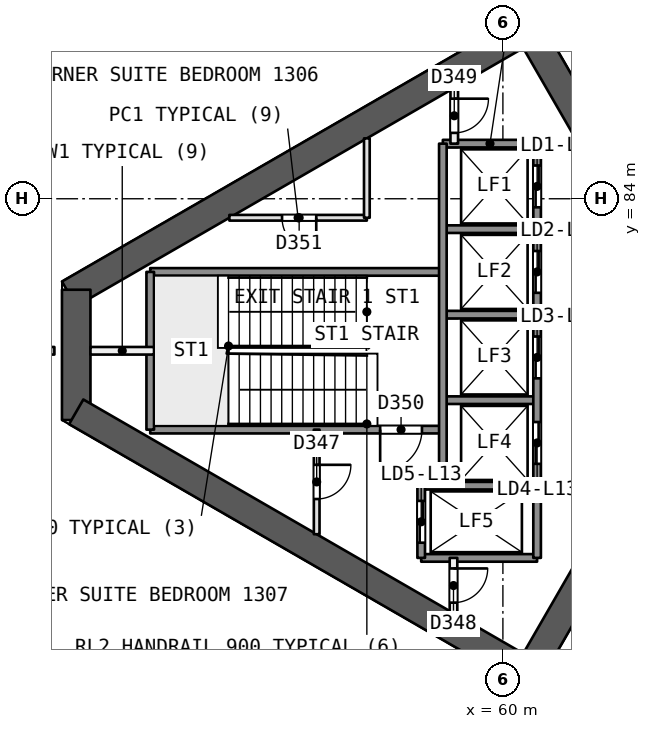
"""IFC4 building model, lengths in metres.
Left out: names, types, materials, properties, quantities, classifications, styles, units other than length and angle.
Written with IfcOpenShell. Run it as: python <this file> out.ifc"""

import sys

from ifc_helpers import new_model, si_unit, direction, frame, frame_2d, origin, place, context, subcontext, project, spatial, rectangle, extrude, element, fill, save


model = new_model("IFC4")
c1 = context("Model", 3, precision=1e-05, world=origin(), true_north=direction((0.0, 1.0)))
c2 = subcontext(c1, "Body", "Model", "MODEL_VIEW")
j1 = project(units=[si_unit("LENGTHUNIT", "METRE"), si_unit("PLANEANGLEUNIT", "RADIAN")], contexts=[c1])
p1 = place(None, origin())
s1 = spatial("IfcSite", under=j1, at=p1, CompositionType="ELEMENT")
p2 = place(p1, origin())
s2 = spatial("IfcBuilding", under=s1, at=p2, CompositionType="ELEMENT")
p3 = place(p2, frame((0.0, 0.0, 61.0)))
s3 = spatial("IfcBuildingStorey", under=s2, at=p3, CompositionType="ELEMENT", Elevation=61.0)
p4 = place(p3, frame((65.567, 80.0, 0.0), z_axis=(0.0, 0.0, 1.0), x_axis=(-0.499988615364, 0.866031976607, 0.0)))
e1 = element("IfcWall", 1, at=p4, inside=s3, PredefinedType="SHEAR", context=c2, shape_type="SweptSolid", body=[
    extrude(rectangle(XDim=10.163, YDim=0.75, at=frame_2d((5.082, 0.0))), origin(), (0.0, 0.0, 1.0), 3.7),
])
p5 = place(p4, frame((0.733, 0.0, 0.0)))
e2 = element("IfcOpeningElement", 2, at=p5, cuts=e1, PredefinedType="OPENING", context=c2, shape_type="SweptSolid", body=[
    extrude(rectangle(XDim=1.2, YDim=2.1, at=frame_2d((0.6, 1.05))), frame((0.0, 0.385, 0.0), z_axis=(0.0, -1.0, 0.0), x_axis=(1.0, 0.0, 0.0)), (0.0, 0.0, 1.0), 0.771),
])
p6 = place(p3, frame((60.673, 88.477, 0.0), z_axis=(0.0, 0.0, 1.0), x_axis=(-0.8660248072, -0.500001033313, 0.0)))
e3 = element("IfcWall", 3, at=p6, inside=s3, PredefinedType="SHEAR", context=c2, shape_type="SweptSolid", body=[
    extrude(rectangle(XDim=13.958, YDim=0.75, at=frame_2d((6.979, 0.0))), origin(), (0.0, 0.0, 1.0), 3.7),
])
p7 = place(p3, frame((48.772, 81.606, 0.0), z_axis=(0.0, 0.0, 1.0), x_axis=(0.0, -1.0, 0.0)))
e4 = element("IfcWall", 4, at=p7, inside=s3, PredefinedType="SHEAR", context=c2, shape_type="SweptSolid", body=[
    extrude(rectangle(XDim=3.429, YDim=0.75, at=frame_2d((1.714, 0.0))), origin(), (0.0, 0.0, 1.0), 3.7),
])
p8 = place(p3, frame((48.772, 78.394, 0.0), z_axis=(0.0, 0.0, 1.0), x_axis=(0.866028339916, -0.499994914436, 0.0)))
e5 = element("IfcWall", 5, at=p8, inside=s3, PredefinedType="SHEAR", context=c2, shape_type="SweptSolid", body=[
    extrude(rectangle(XDim=14.117, YDim=0.75, at=frame_2d((7.059, 0.0))), origin(), (0.0, 0.0, 1.0), 3.7),
])
p9 = place(p3, frame((60.673, 71.523, 0.0), z_axis=(0.0, 0.0, 1.0), x_axis=(0.499997052475, 0.866027105532, 0.0)))
e6 = element("IfcWall", 6, at=p9, inside=s3, PredefinedType="SHEAR", context=c2, shape_type="SweptSolid", body=[
    extrude(rectangle(XDim=10.005, YDim=0.75, at=frame_2d((5.002, 0.0))), origin(), (0.0, 0.0, 1.0), 3.7),
])
p10 = place(p9, frame((7.855, 0.0, 0.0)))
e7 = element("IfcOpeningElement", 7, at=p10, cuts=e6, PredefinedType="OPENING", context=c2, shape_type="SweptSolid", body=[
    extrude(rectangle(XDim=1.2, YDim=2.1, at=frame_2d((0.6, 1.05))), frame((0.0, 0.385, 0.0), z_axis=(0.0, -1.0, 0.0), x_axis=(1.0, 0.0, 0.0)), (0.0, 0.0, 1.0), 0.771),
])
p11 = place(p3, frame((38.72, 80.0, 0.0), z_axis=(0.0, 0.0, 1.0), x_axis=(1.0, 0.0, 0.0)))
e8 = element("IfcWall", 8, at=p11, inside=s3, PredefinedType="PARTITIONING", context=c2, shape_type="SweptSolid", body=[
    extrude(rectangle(XDim=9.478, YDim=0.2, at=frame_2d((4.739, 0.0))), origin(), (0.0, 0.0, 1.0), 3.2),
])
p12 = place(p3, frame((38.571, 83.071, 0.0), z_axis=(0.0, 0.0, 1.0), x_axis=(0.866024926003, 0.500000827541, 0.0)))
e9 = element("IfcWall", 9, at=p12, inside=s3, PredefinedType="SOLIDWALL", context=c2, shape_type="SweptSolid", body=[
    extrude(rectangle(XDim=60.025, YDim=0.3, at=frame_2d((30.013, 0.0))), origin(), (0.0, 0.0, 1.0), 3.2),
])
p13 = place(p12, frame((33.489, 0.0, 0.0)))
e10 = element("IfcOpeningElement", 10, at=p13, cuts=e9, PredefinedType="OPENING", context=c2, shape_type="SweptSolid", body=[
    extrude(rectangle(XDim=2.4, YDim=2.4, at=frame_2d((1.2, 1.2))), frame((0.0, 0.161, 0.0), z_axis=(0.0, -1.0, 0.0), x_axis=(1.0, 0.0, 0.0)), (0.0, 0.0, 1.0), 0.321),
])
p14 = place(p12, frame((46.558, 0.0, 0.0)))
e11 = element("IfcOpeningElement", 11, at=p14, cuts=e9, PredefinedType="OPENING", context=c2, shape_type="SweptSolid", body=[
    extrude(rectangle(XDim=2.4, YDim=2.4, at=frame_2d((1.2, 1.2))), frame((0.0, 0.161, 0.0), z_axis=(0.0, -1.0, 0.0), x_axis=(1.0, 0.0, 0.0)), (0.0, 0.0, 1.0), 0.321),
])
p15 = place(p12, frame((24.136, 0.0, 0.0)))
e12 = element("IfcOpeningElement", 12, at=p15, cuts=e9, PredefinedType="OPENING", context=c2, shape_type="SweptSolid", body=[
    extrude(rectangle(XDim=2.4, YDim=2.4, at=frame_2d((1.2, 1.2))), frame((0.0, 0.161, 0.0), z_axis=(0.0, -1.0, 0.0), x_axis=(1.0, 0.0, 0.0)), (0.0, 0.0, 1.0), 0.321),
])
p16 = place(p12, frame((11.109, 0.0, 0.0)))
e13 = element("IfcOpeningElement", 13, at=p16, cuts=e9, PredefinedType="OPENING", context=c2, shape_type="SweptSolid", body=[
    extrude(rectangle(XDim=2.4, YDim=2.4, at=frame_2d((1.2, 1.2))), frame((0.0, 0.161, 0.0), z_axis=(0.0, -1.0, 0.0), x_axis=(1.0, 0.0, 0.0)), (0.0, 0.0, 1.0), 0.321),
])
p17 = place(p12, frame((28.813, 0.0, 0.0)))
e14 = element("IfcOpeningElement", 14, at=p17, cuts=e9, PredefinedType="OPENING", context=c2, shape_type="SweptSolid", body=[
    extrude(rectangle(XDim=2.4, YDim=2.4, at=frame_2d((1.2, 1.2))), frame((0.0, 0.161, 0.0), z_axis=(0.0, -1.0, 0.0), x_axis=(1.0, 0.0, 0.0)), (0.0, 0.0, 1.0), 0.321),
])
p18 = place(p3, frame((90.555, 46.916, 0.0), z_axis=(0.0, 0.0, 1.0), x_axis=(-0.866024926003, 0.500000827541, 0.0)))
e15 = element("IfcWall", 15, at=p18, inside=s3, PredefinedType="SOLIDWALL", context=c2, shape_type="SweptSolid", body=[
    extrude(rectangle(XDim=60.025, YDim=0.3, at=frame_2d((30.013, 0.0))), origin(), (0.0, 0.0, 1.0), 3.2),
])
p19 = place(p18, frame((28.813, 0.0, 0.0)))
e16 = element("IfcOpeningElement", 16, at=p19, cuts=e15, PredefinedType="OPENING", context=c2, shape_type="SweptSolid", body=[
    extrude(rectangle(XDim=2.4, YDim=2.4, at=frame_2d((1.2, 1.2))), frame((0.0, 0.161, 0.0), z_axis=(0.0, -1.0, 0.0), x_axis=(1.0, 0.0, 0.0)), (0.0, 0.0, 1.0), 0.321),
])
p20 = place(p18, frame((34.269, 0.0, 0.0)))
e17 = element("IfcOpeningElement", 17, at=p20, cuts=e15, PredefinedType="OPENING", context=c2, shape_type="SweptSolid", body=[
    extrude(rectangle(XDim=2.4, YDim=2.4, at=frame_2d((1.2, 1.2))), frame((0.0, 0.161, 0.0), z_axis=(0.0, -1.0, 0.0), x_axis=(1.0, 0.0, 0.0)), (0.0, 0.0, 1.0), 0.321),
])
p21 = place(p18, frame((46.558, 0.0, 0.0)))
e18 = element("IfcOpeningElement", 18, at=p21, cuts=e15, PredefinedType="OPENING", context=c2, shape_type="SweptSolid", body=[
    extrude(rectangle(XDim=2.4, YDim=2.4, at=frame_2d((1.2, 1.2))), frame((0.0, 0.161, 0.0), z_axis=(0.0, -1.0, 0.0), x_axis=(1.0, 0.0, 0.0)), (0.0, 0.0, 1.0), 0.321),
])
p22 = place(p18, frame((23.357, 0.0, 0.0)))
e19 = element("IfcOpeningElement", 19, at=p22, cuts=e15, PredefinedType="OPENING", context=c2, shape_type="SweptSolid", body=[
    extrude(rectangle(XDim=2.4, YDim=2.4, at=frame_2d((1.2, 1.2))), frame((0.0, 0.161, 0.0), z_axis=(0.0, -1.0, 0.0), x_axis=(1.0, 0.0, 0.0)), (0.0, 0.0, 1.0), 0.321),
])
p23 = place(p18, frame((11.109, 0.0, 0.0)))
e20 = element("IfcOpeningElement", 20, at=p23, cuts=e15, PredefinedType="OPENING", context=c2, shape_type="SweptSolid", body=[
    extrude(rectangle(XDim=2.4, YDim=2.4, at=frame_2d((1.2, 1.2))), frame((0.0, 0.161, 0.0), z_axis=(0.0, -1.0, 0.0), x_axis=(1.0, 0.0, 0.0)), (0.0, 0.0, 1.0), 0.321),
])
p24 = place(p3, frame((60.9, 85.45, 0.0), z_axis=(0.0, 0.0, 1.0), x_axis=(-1.0, 0.0, 0.0)))
e21 = element("IfcWall", 21, at=p24, inside=s3, PredefinedType="SOLIDWALL", context=c2, shape_type="SweptSolid", body=[
    extrude(rectangle(XDim=2.48, YDim=0.2, at=frame_2d((1.24, 0.0))), origin(), (0.0, 0.0, 1.0), 3.2),
])
p25 = place(p3, frame((56.42, 83.5, 0.0), z_axis=(0.0, 0.0, 1.0), x_axis=(-1.0, 0.0, 0.0)))
e22 = element("IfcWall", 22, at=p25, inside=s3, PredefinedType="PARTITIONING", context=c2, shape_type="SweptSolid", body=[
    extrude(rectangle(XDim=3.618, YDim=0.15, at=frame_2d((1.809, 0.0))), origin(), (0.0, 0.0, 1.0), 3.2),
])
p26 = place(p25, frame((1.332, 0.0, 0.0)))
e23 = element("IfcOpeningElement", 23, at=p26, cuts=e22, PredefinedType="OPENING", context=c2, shape_type="SweptSolid", body=[
    extrude(rectangle(XDim=0.9, YDim=2.1, at=frame_2d((0.45, 1.05))), frame((0.0, 0.085, 0.0), z_axis=(0.0, -1.0, 0.0), x_axis=(1.0, 0.0, 0.0)), (0.0, 0.0, 1.0), 0.171),
])
p27 = place(p3, frame((60.9, 83.2, 0.0), z_axis=(0.0, 0.0, 1.0), x_axis=(-1.0, 0.0, 0.0)))
e24 = element("IfcWall", 24, at=p27, inside=s3, PredefinedType="SOLIDWALL", context=c2, shape_type="SweptSolid", body=[
    extrude(rectangle(XDim=2.48, YDim=0.2, at=frame_2d((1.24, 0.0))), origin(), (0.0, 0.0, 1.0), 3.2),
])
p28 = place(p3, frame((58.42, 82.075, 0.0), z_axis=(0.0, 0.0, 1.0), x_axis=(-1.0, 0.0, 0.0)))
e25 = element("IfcWall", 25, at=p28, inside=s3, PredefinedType="SOLIDWALL", context=c2, shape_type="SweptSolid", body=[
    extrude(rectangle(XDim=7.7, YDim=0.2, at=frame_2d((3.85, 0.0))), origin(), (0.0, 0.0, 1.0), 3.2),
])
p29 = place(p3, frame((60.9, 80.95, 0.0), z_axis=(0.0, 0.0, 1.0), x_axis=(-1.0, 0.0, 0.0)))
e26 = element("IfcWall", 26, at=p29, inside=s3, PredefinedType="SOLIDWALL", context=c2, shape_type="SweptSolid", body=[
    extrude(rectangle(XDim=2.48, YDim=0.2, at=frame_2d((1.24, 0.0))), origin(), (0.0, 0.0, 1.0), 3.2),
])
p30 = place(p3, frame((50.82, 80.0, 0.0), z_axis=(0.0, 0.0, 1.0), x_axis=(-1.0, 0.0, 0.0)))
e27 = element("IfcWall", 27, at=p30, inside=s3, PredefinedType="PARTITIONING", context=c2, shape_type="SweptSolid", body=[
    extrude(rectangle(XDim=1.673, YDim=0.2, at=frame_2d((0.836, 0.0))), origin(), (0.0, 0.0, 1.0), 3.2),
])
p31 = place(p3, frame((60.9, 78.7, 0.0), z_axis=(0.0, 0.0, 1.0), x_axis=(-1.0, 0.0, 0.0)))
e28 = element("IfcWall", 28, at=p31, inside=s3, PredefinedType="SOLIDWALL", context=c2, shape_type="SweptSolid", body=[
    extrude(rectangle(XDim=2.48, YDim=0.2, at=frame_2d((1.24, 0.0))), origin(), (0.0, 0.0, 1.0), 3.2),
])
p32 = place(p3, frame((58.42, 77.925, 0.0), z_axis=(0.0, 0.0, 1.0), x_axis=(-1.0, 0.0, 0.0)))
e29 = element("IfcWall", 29, at=p32, inside=s3, PredefinedType="SOLIDWALL", context=c2, shape_type="SweptSolid", body=[
    extrude(rectangle(XDim=7.7, YDim=0.2, at=frame_2d((3.85, 0.0))), origin(), (0.0, 0.0, 1.0), 3.2),
])
p33 = place(p32, frame((0.55, 0.0, 0.0)))
e30 = element("IfcOpeningElement", 30, at=p33, cuts=e29, PredefinedType="OPENING", context=c2, shape_type="SweptSolid", body=[
    extrude(rectangle(XDim=1.1, YDim=2.1, at=frame_2d((0.55, 1.05))), frame((0.0, 0.11, 0.0), z_axis=(0.0, -1.0, 0.0), x_axis=(1.0, 0.0, 0.0)), (0.0, 0.0, 1.0), 0.221),
])
for number, where, z_axis, x_axis in (
    (31, (60.9, 76.45, 0.0), (0.0, 0.0, 1.0), (-1.0, 0.0, 0.0)),
    (32, (60.9, 74.55, 0.0), (0.0, 0.0, 1.0), (-1.0, 0.0, 0.0)),
):
    element("IfcWall", number, at=place(p3, frame(where, z_axis=z_axis, x_axis=x_axis)), inside=s3, PredefinedType="SOLIDWALL", context=c2, shape_type="SweptSolid", body=[
        extrude(rectangle(XDim=3.05, YDim=0.2, at=frame_2d((1.525, 0.0))), origin(), (0.0, 0.0, 1.0), 3.2),
    ])
p34 = place(p3, frame((60.9, 85.45, 0.0), z_axis=(0.0, 0.0, 1.0), x_axis=(0.0, -1.0, 0.0)))
e33 = element("IfcWall", 33, at=p34, inside=s3, PredefinedType="SOLIDWALL", context=c2, shape_type="SweptSolid", body=[
    extrude(rectangle(XDim=10.9, YDim=0.2, at=frame_2d((5.45, 0.0))), origin(), (0.0, 0.0, 1.0), 3.2),
])
p35 = place(p34, frame((0.575, 0.0, 0.0)))
e34 = element("IfcOpeningElement", 34, at=p35, cuts=e33, PredefinedType="OPENING", context=c2, shape_type="SweptSolid", body=[
    extrude(rectangle(XDim=1.1, YDim=2.1, at=frame_2d((0.55, 1.05))), frame((0.0, 0.11, 0.0), z_axis=(0.0, -1.0, 0.0), x_axis=(1.0, 0.0, 0.0)), (0.0, 0.0, 1.0), 0.221),
])
p36 = place(p34, frame((2.825, 0.0, 0.0)))
e35 = element("IfcOpeningElement", 35, at=p36, cuts=e33, PredefinedType="OPENING", context=c2, shape_type="SweptSolid", body=[
    extrude(rectangle(XDim=1.1, YDim=2.1, at=frame_2d((0.55, 1.05))), frame((0.0, 0.11, 0.0), z_axis=(0.0, -1.0, 0.0), x_axis=(1.0, 0.0, 0.0)), (0.0, 0.0, 1.0), 0.221),
])
p37 = place(p34, frame((5.075, 0.0, 0.0)))
e36 = element("IfcOpeningElement", 36, at=p37, cuts=e33, PredefinedType="OPENING", context=c2, shape_type="SweptSolid", body=[
    extrude(rectangle(XDim=1.1, YDim=2.1, at=frame_2d((0.55, 1.05))), frame((0.0, 0.11, 0.0), z_axis=(0.0, -1.0, 0.0), x_axis=(1.0, 0.0, 0.0)), (0.0, 0.0, 1.0), 0.221),
])
p38 = place(p34, frame((7.325, 0.0, 0.0)))
e37 = element("IfcOpeningElement", 37, at=p38, cuts=e33, PredefinedType="OPENING", context=c2, shape_type="SweptSolid", body=[
    extrude(rectangle(XDim=1.1, YDim=2.1, at=frame_2d((0.55, 1.05))), frame((0.0, 0.11, 0.0), z_axis=(0.0, -1.0, 0.0), x_axis=(1.0, 0.0, 0.0)), (0.0, 0.0, 1.0), 0.221),
])
p39 = place(p3, frame((58.72, 86.917, 0.0), z_axis=(0.0, 0.0, 1.0), x_axis=(0.0, -1.0, 0.0)))
e38 = element("IfcWall", 38, at=p39, inside=s3, PredefinedType="PARTITIONING", context=c2, shape_type="SweptSolid", body=[
    extrude(rectangle(XDim=1.467, YDim=0.2, at=frame_2d((0.733, 0.0))), origin(), (0.0, 0.0, 1.0), 3.2),
])
p40 = place(p39, frame((0.283, 0.0, 0.0)))
e39 = element("IfcOpeningElement", 39, at=p40, cuts=e38, PredefinedType="OPENING", context=c2, shape_type="SweptSolid", body=[
    extrude(rectangle(XDim=0.9, YDim=2.1, at=frame_2d((0.45, 1.05))), frame((0.0, 0.11, 0.0), z_axis=(0.0, -1.0, 0.0), x_axis=(1.0, 0.0, 0.0)), (0.0, 0.0, 1.0), 0.221),
])
p41 = place(p3, frame((58.7, 74.55, 0.0), z_axis=(0.0, 0.0, 1.0), x_axis=(0.0, -1.0, 0.0)))
e40 = element("IfcWall", 40, at=p41, inside=s3, PredefinedType="PARTITIONING", context=c2, shape_type="SweptSolid", body=[
    extrude(rectangle(XDim=1.455, YDim=0.2, at=frame_2d((0.728, 0.0))), origin(), (0.0, 0.0, 1.0), 3.2),
])
p42 = place(p41, frame((0.278, 0.0, 0.0)))
e41 = element("IfcOpeningElement", 41, at=p42, cuts=e40, PredefinedType="OPENING", context=c2, shape_type="SweptSolid", body=[
    extrude(rectangle(XDim=0.9, YDim=2.1, at=frame_2d((0.45, 1.05))), frame((0.0, 0.11, 0.0), z_axis=(0.0, -1.0, 0.0), x_axis=(1.0, 0.0, 0.0)), (0.0, 0.0, 1.0), 0.221),
])
p43 = place(p3, frame((58.42, 85.45, 0.0), z_axis=(0.0, 0.0, 1.0), x_axis=(0.0, -1.0, 0.0)))
e42 = element("IfcWall", 42, at=p43, inside=s3, PredefinedType="SOLIDWALL", context=c2, shape_type="SweptSolid", body=[
    extrude(rectangle(XDim=9.0, YDim=0.2, at=frame_2d((4.5, 0.0))), origin(), (0.0, 0.0, 1.0), 3.2),
])
p44 = place(p3, frame((57.85, 76.45, 0.0), z_axis=(0.0, 0.0, 1.0), x_axis=(0.0, -1.0, 0.0)))
e43 = element("IfcWall", 43, at=p44, inside=s3, PredefinedType="SOLIDWALL", context=c2, shape_type="SweptSolid", body=[
    extrude(rectangle(XDim=1.9, YDim=0.2, at=frame_2d((0.95, 0.0))), origin(), (0.0, 0.0, 1.0), 3.2),
])
p45 = place(p44, frame((0.4, 0.0, 0.0)))
e44 = element("IfcOpeningElement", 44, at=p45, cuts=e43, PredefinedType="OPENING", context=c2, shape_type="SweptSolid", body=[
    extrude(rectangle(XDim=1.1, YDim=2.1, at=frame_2d((0.55, 1.05))), frame((0.0, 0.11, 0.0), z_axis=(0.0, -1.0, 0.0), x_axis=(1.0, 0.0, 0.0)), (0.0, 0.0, 1.0), 0.221),
])
p46 = place(p3, frame((56.42, 85.589, 0.0), z_axis=(0.0, 0.0, 1.0), x_axis=(0.0, -1.0, 0.0)))
e45 = element("IfcWall", 45, at=p46, inside=s3, PredefinedType="PARTITIONING", context=c2, shape_type="SweptSolid", body=[
    extrude(rectangle(XDim=2.089, YDim=0.15, at=frame_2d((1.044, 0.0))), origin(), (0.0, 0.0, 1.0), 3.2),
])
p47 = place(p3, frame((55.1, 77.925, 0.0), z_axis=(0.0, 0.0, 1.0), x_axis=(0.0, -1.0, 0.0)))
e46 = element("IfcWall", 46, at=p47, inside=s3, PredefinedType="PARTITIONING", context=c2, shape_type="SweptSolid", body=[
    extrude(rectangle(XDim=2.752, YDim=0.15, at=frame_2d((1.376, 0.0))), origin(), (0.0, 0.0, 1.0), 3.2),
])
p48 = place(p47, frame((0.926, 0.0, 0.0)))
e47 = element("IfcOpeningElement", 47, at=p48, cuts=e46, PredefinedType="OPENING", context=c2, shape_type="SweptSolid", body=[
    extrude(rectangle(XDim=0.9, YDim=2.1, at=frame_2d((0.45, 1.05))), frame((0.0, 0.085, 0.0), z_axis=(0.0, -1.0, 0.0), x_axis=(1.0, 0.0, 0.0)), (0.0, 0.0, 1.0), 0.171),
])
p49 = place(p3, frame((50.72, 82.075, 0.0), z_axis=(0.0, 0.0, 1.0), x_axis=(0.0, -1.0, 0.0)))
e48 = element("IfcWall", 48, at=p49, inside=s3, PredefinedType="SOLIDWALL", context=c2, shape_type="SweptSolid", body=[
    extrude(rectangle(XDim=4.15, YDim=0.2, at=frame_2d((2.075, 0.0))), origin(), (0.0, 0.0, 1.0), 3.2),
])
p50 = place(p35, origin())
e49 = element("IfcDoor", 49, at=p50, inside=s3, OperationType="SLIDING_TO_RIGHT", PredefinedType="NOTDEFINED", context=c2, shape_type="SweptSolid", body=[
    extrude(rectangle(XDim=1.1, YDim=2.1, at=frame_2d((0.55, 1.05))), frame((0.0, 0.025, 0.0), z_axis=(0.0, -1.0, 0.0), x_axis=(1.0, 0.0, 0.0)), (0.0, 0.0, 1.0), 0.05),
])
fill(e34, e49)
p51 = place(p36, origin())
e50 = element("IfcDoor", 50, at=p51, inside=s3, OperationType="SLIDING_TO_LEFT", PredefinedType="NOTDEFINED", context=c2, shape_type="SweptSolid", body=[
    extrude(rectangle(XDim=1.1, YDim=2.1, at=frame_2d((0.55, 1.05))), frame((0.0, 0.025, 0.0), z_axis=(0.0, -1.0, 0.0), x_axis=(1.0, 0.0, 0.0)), (0.0, 0.0, 1.0), 0.05),
])
fill(e35, e50)
p52 = place(p37, origin())
e51 = element("IfcDoor", 51, at=p52, inside=s3, OperationType="SLIDING_TO_RIGHT", PredefinedType="NOTDEFINED", context=c2, shape_type="SweptSolid", body=[
    extrude(rectangle(XDim=1.1, YDim=2.1, at=frame_2d((0.55, 1.05))), frame((0.0, 0.025, 0.0), z_axis=(0.0, -1.0, 0.0), x_axis=(1.0, 0.0, 0.0)), (0.0, 0.0, 1.0), 0.05),
])
fill(e36, e51)
p53 = place(p38, origin())
e52 = element("IfcDoor", 52, at=p53, inside=s3, OperationType="SLIDING_TO_LEFT", PredefinedType="NOTDEFINED", context=c2, shape_type="SweptSolid", body=[
    extrude(rectangle(XDim=1.1, YDim=2.1, at=frame_2d((0.55, 1.05))), frame((0.0, 0.025, 0.0), z_axis=(0.0, -1.0, 0.0), x_axis=(1.0, 0.0, 0.0)), (0.0, 0.0, 1.0), 0.05),
])
fill(e37, e52)
p54 = place(p45, origin())
e53 = element("IfcDoor", 53, at=p54, inside=s3, OperationType="SLIDING_TO_RIGHT", PredefinedType="NOTDEFINED", context=c2, shape_type="SweptSolid", body=[
    extrude(rectangle(XDim=1.1, YDim=2.1, at=frame_2d((0.55, 1.05))), frame((0.0, 0.025, 0.0), z_axis=(0.0, -1.0, 0.0), x_axis=(1.0, 0.0, 0.0)), (0.0, 0.0, 1.0), 0.05),
])
fill(e44, e53)
p55 = place(p48, origin())
e54 = element("IfcDoor", 54, at=p55, inside=s3, OperationType="SINGLE_SWING_LEFT", PredefinedType="NOTDEFINED", context=c2, shape_type="SweptSolid", body=[
    extrude(rectangle(XDim=0.9, YDim=2.1, at=frame_2d((0.45, 1.05))), frame((0.0, 0.025, 0.0), z_axis=(0.0, -1.0, 0.0), x_axis=(1.0, 0.0, 0.0)), (0.0, 0.0, 1.0), 0.05),
])
fill(e47, e54)
p56 = place(p42, origin())
e55 = element("IfcDoor", 55, at=p56, inside=s3, OperationType="SINGLE_SWING_LEFT", PredefinedType="NOTDEFINED", context=c2, shape_type="SweptSolid", body=[
    extrude(rectangle(XDim=0.9, YDim=2.1, at=frame_2d((0.45, 1.05))), frame((0.0, 0.025, 0.0), z_axis=(0.0, -1.0, 0.0), x_axis=(1.0, 0.0, 0.0)), (0.0, 0.0, 1.0), 0.05),
])
fill(e41, e55)
p57 = place(p40, origin())
e56 = element("IfcDoor", 56, at=p57, inside=s3, OperationType="SINGLE_SWING_LEFT", PredefinedType="NOTDEFINED", context=c2, shape_type="SweptSolid", body=[
    extrude(rectangle(XDim=0.9, YDim=2.1, at=frame_2d((0.45, 1.05))), frame((0.0, 0.025, 0.0), z_axis=(0.0, -1.0, 0.0), x_axis=(1.0, 0.0, 0.0)), (0.0, 0.0, 1.0), 0.05),
])
fill(e39, e56)
p58 = place(p33, origin())
e57 = element("IfcDoor", 57, at=p58, inside=s3, OperationType="SINGLE_SWING_RIGHT", PredefinedType="NOTDEFINED", context=c2, shape_type="SweptSolid", body=[
    extrude(rectangle(XDim=1.1, YDim=2.1, at=frame_2d((0.55, 1.05))), frame((0.0, 0.025, 0.0), z_axis=(0.0, -1.0, 0.0), x_axis=(1.0, 0.0, 0.0)), (0.0, 0.0, 1.0), 0.05),
])
fill(e30, e57)
p59 = place(p26, origin())
e58 = element("IfcDoor", 58, at=p59, inside=s3, OperationType="SINGLE_SWING_LEFT", PredefinedType="NOTDEFINED", context=c2, shape_type="SweptSolid", body=[
    extrude(rectangle(XDim=0.9, YDim=2.1, at=frame_2d((0.45, 1.05))), frame((0.0, 0.025, 0.0), z_axis=(0.0, -1.0, 0.0), x_axis=(1.0, 0.0, 0.0)), (0.0, 0.0, 1.0), 0.05),
])
fill(e23, e58)
save(model, sys.argv[1])
